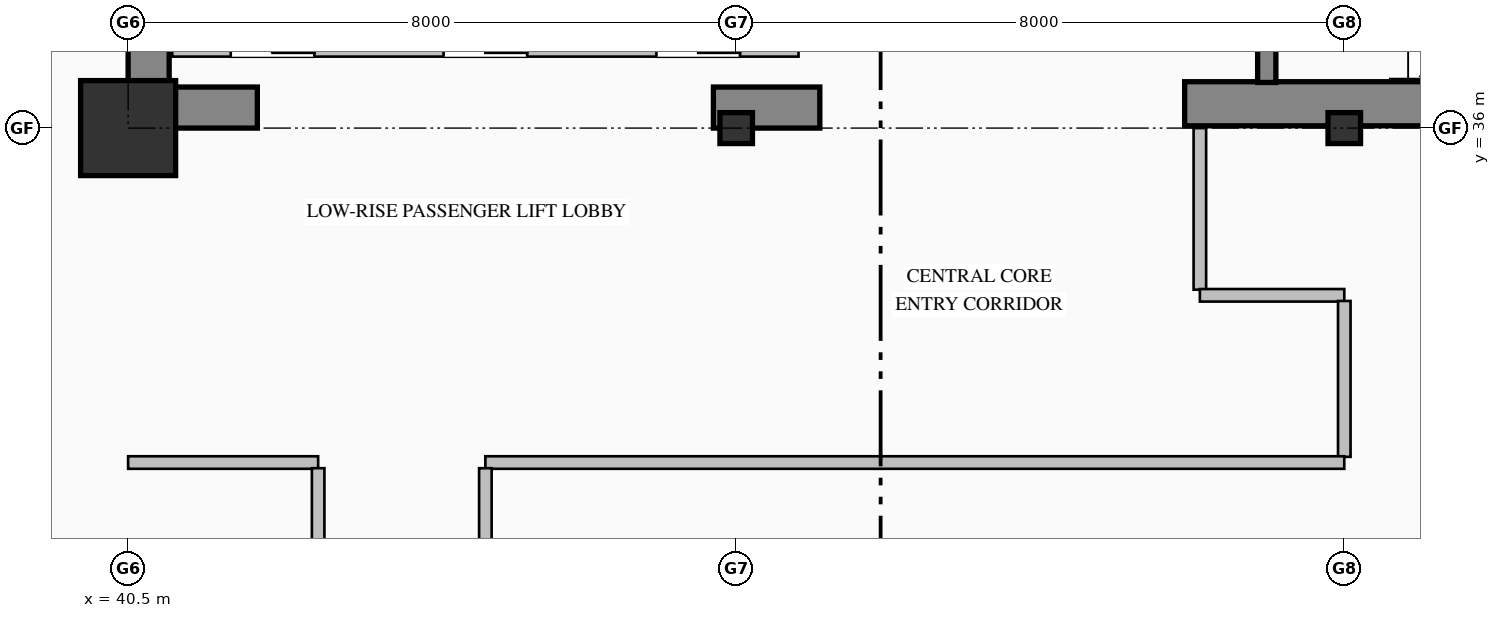
"""IFC4 building model, lengths in metres.
Left out: names, types, materials, properties, quantities, classifications, styles, units other than length and angle.
Written with IfcOpenShell. Run it as: python <this file> out.ifc"""

import sys

from ifc_helpers import new_model, si_unit, direction, frame, frame_2d, origin, origin_2d, place, context, subcontext, project, spatial, rectangle, hollow_rectangle, i_section, extrude, element, save


model = new_model("IFC4")
c1 = context("Model", 3, precision=1e-05, world=origin(), true_north=direction((0.0, 1.0)))
c2 = subcontext(c1, "Body", "Model", "MODEL_VIEW")
j1 = project(units=[si_unit("LENGTHUNIT", "METRE"), si_unit("PLANEANGLEUNIT", "RADIAN")], contexts=[c1])
p1 = place(None, origin())
s1 = spatial("IfcSite", under=j1, at=p1, CompositionType="ELEMENT")
p2 = place(p1, origin())
s2 = spatial("IfcBuilding", under=s1, at=p2, CompositionType="ELEMENT")
p3 = place(p2, frame((0.0, 0.0, 44.2)))
s3 = spatial("IfcBuildingStorey", under=s2, at=p3, CompositionType="ELEMENT", Elevation=44.2)
p4 = place(p3, frame((40.77, 36.54, 0.0), z_axis=(0.0, 0.0, 1.0), x_axis=(0.0, 1.0, 0.0)))
e1 = element("IfcWall", 1, at=p4, inside=s3, PredefinedType="SHEAR", context=c2, shape_type="SweptSolid", body=[
    extrude(rectangle(XDim=7.86, YDim=0.54, at=frame_2d((3.93, 0.0))), origin(), (0.0, 0.0, 1.0), 3.75),
])
p5 = place(p3, frame((40.5, 36.27, 0.0), z_axis=(0.0, 0.0, 1.0), x_axis=(1.0, 0.0, 0.0)))
e2 = element("IfcWall", 2, at=p5, inside=s3, PredefinedType="SHEAR", context=c2, shape_type="SweptSolid", body=[
    extrude(rectangle(XDim=1.7, YDim=0.54, at=frame_2d((0.85, 0.0))), origin(), (0.0, 0.0, 1.0), 3.75),
])
p6 = place(p3, frame((48.2, 36.27, 0.0), z_axis=(0.0, 0.0, 1.0), x_axis=(1.0, 0.0, 0.0)))
e3 = element("IfcWall", 3, at=p6, inside=s3, PredefinedType="SHEAR", context=c2, shape_type="SweptSolid", body=[
    extrude(rectangle(XDim=1.4, YDim=0.54, at=frame_2d((0.7, 0.0))), origin(), (0.0, 0.0, 1.0), 3.75),
])
p7 = place(p3, frame((54.4, 36.32, 0.0), z_axis=(0.0, 0.0, 1.0), x_axis=(1.0, 0.0, 0.0)))
e4 = element("IfcWall", 4, at=p7, inside=s3, PredefinedType="SHEAR", context=c2, shape_type="SweptSolid", body=[
    extrude(rectangle(XDim=9.6, YDim=0.58, at=frame_2d((4.8, 0.0))), origin(), (0.0, 0.0, 1.0), 4.0),
])
p8 = place(p3, frame((40.5, 36.0, 0.0), z_axis=(0.0, 0.0, 1.0), x_axis=(1.0, 0.0, 0.0)))
e5 = element("IfcColumn", 5, at=p8, inside=s3, PredefinedType="COLUMN", context=c2, shape_type="SweptSolid", body=[
    extrude(hollow_rectangle(XDim=1.25, YDim=1.25, WallThickness=0.045, at=origin_2d()), origin(), (0.0, 0.0, 1.0), 4.0),
])
for number, where, z_axis, x_axis in (
    (6, (48.5, 36.0, 0.0), (0.0, 0.0, 1.0), (1.0, 0.0, 0.0)),
    (7, (56.5, 36.0, 0.0), (0.0, 0.0, 1.0), (1.0, 0.0, 0.0)),
):
    element("IfcColumn", number, at=place(p3, frame(where, z_axis=z_axis, x_axis=x_axis)), inside=s3, PredefinedType="COLUMN", context=c2, shape_type="SweptSolid", body=[
        extrude(i_section(OverallWidth=0.407, OverallDepth=0.428, WebThickness=0.02, FlangeThickness=0.035, FilletRadius=0.022, at=origin_2d()), origin(), (0.0, 0.0, 1.0), 4.0),
    ])
p9 = place(p3, frame((55.48, 39.75, 0.0), z_axis=(0.0, 0.0, 1.0), x_axis=(0.0, -1.0, 0.0)))
e8 = element("IfcWall", 8, at=p9, inside=s3, PredefinedType="SOLIDWALL", context=c2, shape_type="SweptSolid", body=[
    extrude(rectangle(XDim=3.15, YDim=0.24, at=frame_2d((1.575, 0.0))), origin(), (0.0, 0.0, 1.0), 4.0),
])
p10 = place(p9, frame((1.0, 0.0, 0.0)))
e9 = element("IfcOpeningElement", 9, at=p10, cuts=e8, PredefinedType="OPENING", context=c2, shape_type="SweptSolid", body=[
    extrude(rectangle(XDim=1.15, YDim=2.2, at=frame_2d((0.575, 1.1))), frame((0.0, 0.13, 0.0), z_axis=(0.0, -1.0, 0.0), x_axis=(1.0, 0.0, 0.0)), (0.0, 0.0, 1.0), 0.26),
])
p11 = place(p3, frame((49.32, 37.05, 0.0), z_axis=(0.0, 0.0, 1.0), x_axis=(-1.0, 0.0, 0.0)))
e10 = element("IfcWall", 10, at=p11, inside=s3, PredefinedType="PARTITIONING", context=c2, shape_type="SweptSolid", body=[
    extrude(rectangle(XDim=8.24, YDim=0.22, at=frame_2d((4.12, 0.0))), origin(), (0.0, 0.0, 1.0), 3.75),
])
p12 = place(p11, frame((6.37, 0.0, 0.0)))
e11 = element("IfcOpeningElement", 11, at=p12, cuts=e10, PredefinedType="OPENING", context=c2, shape_type="SweptSolid", body=[
    extrude(rectangle(XDim=1.1, YDim=2.2, at=frame_2d((0.55, 1.1))), frame((0.0, 0.12, 0.0), z_axis=(0.0, -1.0, 0.0), x_axis=(1.0, 0.0, 0.0)), (0.0, 0.0, 1.0), 0.24),
])
p13 = place(p11, frame((3.57, 0.0, 0.0)))
e12 = element("IfcOpeningElement", 12, at=p13, cuts=e10, PredefinedType="OPENING", context=c2, shape_type="SweptSolid", body=[
    extrude(rectangle(XDim=1.1, YDim=2.2, at=frame_2d((0.55, 1.1))), frame((0.0, 0.12, 0.0), z_axis=(0.0, -1.0, 0.0), x_axis=(1.0, 0.0, 0.0)), (0.0, 0.0, 1.0), 0.24),
])
p14 = place(p11, frame((0.77, 0.0, 0.0)))
e13 = element("IfcOpeningElement", 13, at=p14, cuts=e10, PredefinedType="OPENING", context=c2, shape_type="SweptSolid", body=[
    extrude(rectangle(XDim=1.1, YDim=2.2, at=frame_2d((0.55, 1.1))), frame((0.0, 0.12, 0.0), z_axis=(0.0, -1.0, 0.0), x_axis=(1.0, 0.0, 0.0)), (0.0, 0.0, 1.0), 0.24),
])
p15 = place(p3, frame((54.6, 36.0, 0.0), z_axis=(0.0, 0.0, 1.0), x_axis=(0.0, -1.0, 0.0)))
e14 = element("IfcWall", 14, at=p15, inside=s3, PredefinedType="PARTITIONING", context=c2, shape_type="SweptSolid", body=[
    extrude(rectangle(XDim=2.125, YDim=0.165, at=frame_2d((1.063, 0.0))), origin(), (0.0, 0.0, 1.0), 3.75),
])
p16 = place(p3, frame((54.6, 33.8, 0.0), z_axis=(0.0, 0.0, 1.0), x_axis=(1.0, 0.0, 0.0)))
e15 = element("IfcWall", 15, at=p16, inside=s3, PredefinedType="PARTITIONING", context=c2, shape_type="SweptSolid", body=[
    extrude(rectangle(XDim=1.9, YDim=0.165, at=frame_2d((0.95, 0.0))), origin(), (0.0, 0.0, 1.0), 3.75),
])
p17 = place(p3, frame((56.5, 33.726, 0.0), z_axis=(0.0, 0.0, 1.0), x_axis=(0.0, -1.0, 0.0)))
e16 = element("IfcWall", 16, at=p17, inside=s3, PredefinedType="PARTITIONING", context=c2, shape_type="SweptSolid", body=[
    extrude(rectangle(XDim=2.051, YDim=0.165, at=frame_2d((1.025, 0.0))), origin(), (0.0, 0.0, 1.0), 3.042),
])
p18 = place(p3, frame((56.5, 31.6, 0.0), z_axis=(0.0, 0.0, 1.0), x_axis=(-1.0, 0.0, 0.0)))
e17 = element("IfcWall", 17, at=p18, inside=s3, PredefinedType="PARTITIONING", context=c2, shape_type="SweptSolid", body=[
    extrude(rectangle(XDim=11.3, YDim=0.165, at=frame_2d((5.65, 0.0))), origin(), (0.0, 0.0, 1.0), 3.75),
])
p19 = place(p3, frame((43.0, 31.6, 0.0), z_axis=(0.0, 0.0, 1.0), x_axis=(-1.0, 0.0, 0.0)))
e18 = element("IfcWall", 18, at=p19, inside=s3, PredefinedType="PARTITIONING", context=c2, shape_type="SweptSolid", body=[
    extrude(rectangle(XDim=2.5, YDim=0.165, at=frame_2d((1.25, 0.0))), origin(), (0.0, 0.0, 1.0), 3.75),
])
p20 = place(p3, frame((45.2, 31.525, 0.0), z_axis=(0.0, 0.0, 1.0), x_axis=(0.0, -1.0, 0.0)))
e19 = element("IfcWall", 19, at=p20, inside=s3, PredefinedType="PARTITIONING", context=c2, shape_type="SweptSolid", body=[
    extrude(rectangle(XDim=16.751, YDim=0.165, at=frame_2d((8.375, 0.0))), origin(), (0.0, 0.0, 1.0), 3.75),
])
p21 = place(p20, frame((7.875, 0.0, 0.0)))
e20 = element("IfcOpeningElement", 20, at=p21, cuts=e19, PredefinedType="OPENING", context=c2, shape_type="SweptSolid", body=[
    extrude(rectangle(XDim=1.0, YDim=2.15, at=frame_2d((0.5, 1.075))), frame((0.0, 0.093, 0.0), z_axis=(0.0, -1.0, 0.0), x_axis=(1.0, 0.0, 0.0)), (0.0, 0.0, 1.0), 0.185),
])
p22 = place(p3, frame((43.0, 12.574, 0.0), z_axis=(0.0, 0.0, 1.0), x_axis=(0.0, 1.0, 0.0)))
e21 = element("IfcWall", 21, at=p22, inside=s3, PredefinedType="PARTITIONING", context=c2, shape_type="SweptSolid", body=[
    extrude(rectangle(XDim=18.951, YDim=0.165, at=frame_2d((9.476, 0.0))), origin(), (0.0, 0.0, 1.0), 3.75),
])
p23 = place(p22, frame((8.976, 0.0, 0.0)))
e22 = element("IfcOpeningElement", 22, at=p23, cuts=e21, PredefinedType="OPENING", context=c2, shape_type="SweptSolid", body=[
    extrude(rectangle(XDim=1.0, YDim=2.15, at=frame_2d((0.5, 1.075))), frame((0.0, 0.093, 0.0), z_axis=(0.0, -1.0, 0.0), x_axis=(1.0, 0.0, 0.0)), (0.0, 0.0, 1.0), 0.185),
])
save(model, sys.argv[1])
